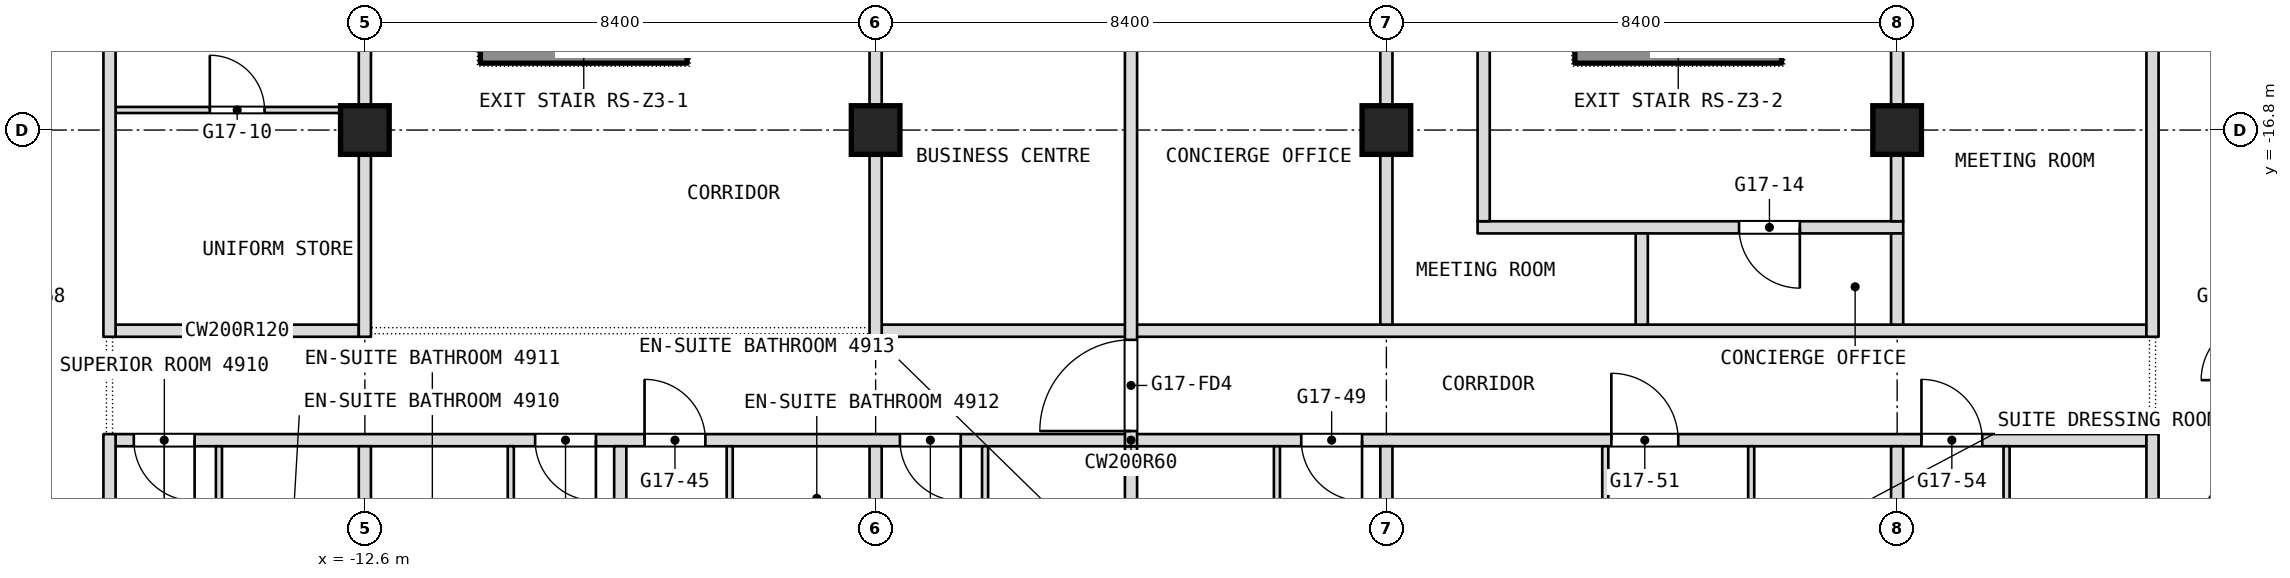
"""IFC4 building model, lengths in metres.
Left out: names, types, materials, properties, quantities, classifications, styles, units other than length and angle.
Written with IfcOpenShell. Run it as: python <this file> out.ifc"""

import sys

from ifc_helpers import new_model, si_unit, direction, frame, frame_2d, origin, origin_2d, place, context, subcontext, project, spatial, rectangle, extrude, element, fill, save


model = new_model("IFC4")
c1 = context("Model", 3, precision=1e-05, world=origin(), true_north=direction((0.0, 1.0)))
c2 = subcontext(c1, "Body", "Model", "MODEL_VIEW")
j1 = project(units=[si_unit("LENGTHUNIT", "METRE"), si_unit("PLANEANGLEUNIT", "RADIAN")], contexts=[c1])
p1 = place(None, origin())
s1 = spatial("IfcSite", under=j1, at=p1, CompositionType="ELEMENT")
p2 = place(p1, origin())
s2 = spatial("IfcBuilding", under=s1, at=p2, CompositionType="ELEMENT")
p3 = place(p2, frame((0.0, 0.0, 212.9)))
s3 = spatial("IfcBuildingStorey", under=s2, at=p3, CompositionType="ELEMENT", Elevation=212.9)
for number, where, z_axis, x_axis in (
    (1, (-12.6, -16.8, 0.0), (0.0, 0.0, 1.0), (1.0, 0.0, 0.0)),
    (2, (-4.2, -16.8, 0.0), (0.0, 0.0, 1.0), (1.0, 0.0, 0.0)),
    (3, (4.2, -16.8, 0.0), (0.0, 0.0, 1.0), (1.0, 0.0, 0.0)),
    (4, (12.6, -16.8, 0.0), (0.0, 0.0, 1.0), (1.0, 0.0, 0.0)),
):
    element("IfcColumn", number, at=place(p3, frame(where, z_axis=z_axis, x_axis=x_axis)), inside=s3, PredefinedType="COLUMN", context=c2, shape_type="SweptSolid", body=[
        extrude(rectangle(XDim=0.8, YDim=0.8, at=origin_2d()), origin(), (0.0, 0.0, 1.0), 3.6),
    ])
p4 = place(p3, frame((-16.7, -21.9, 0.0), z_axis=(0.0, 0.0, 1.0), x_axis=(1.0, 0.0, 0.0)))
e5 = element("IfcWall", 5, at=p4, inside=s3, PredefinedType="PARTITIONING", context=c2, shape_type="SweptSolid", body=[
    extrude(rectangle(XDim=33.4, YDim=0.2, at=frame_2d((16.7, 0.0))), origin(), (0.0, 0.0, 1.0), 3.34),
])
p5 = place(p4, frame((0.3, 0.0, 0.0)))
e6 = element("IfcOpeningElement", 6, at=p5, cuts=e5, PredefinedType="OPENING", context=c2, shape_type="SweptSolid", body=[
    extrude(rectangle(XDim=1.0, YDim=2.1, at=frame_2d((0.5, 1.05))), frame((0.0, 0.1, 0.0), z_axis=(0.0, -1.0, 0.0), x_axis=(1.0, 0.0, 0.0)), (0.0, 0.0, 1.0), 0.2),
])
p6 = place(p4, frame((6.9, 0.0, 0.0)))
e7 = element("IfcOpeningElement", 7, at=p6, cuts=e5, PredefinedType="OPENING", context=c2, shape_type="SweptSolid", body=[
    extrude(rectangle(XDim=1.0, YDim=2.1, at=frame_2d((0.5, 1.05))), frame((0.0, 0.1, 0.0), z_axis=(0.0, -1.0, 0.0), x_axis=(1.0, 0.0, 0.0)), (0.0, 0.0, 1.0), 0.2),
])
p7 = place(p4, frame((8.7, 0.0, 0.0)))
e8 = element("IfcOpeningElement", 8, at=p7, cuts=e5, PredefinedType="OPENING", context=c2, shape_type="SweptSolid", body=[
    extrude(rectangle(XDim=1.0, YDim=2.1, at=frame_2d((0.5, 1.05))), frame((0.0, 0.1, 0.0), z_axis=(0.0, -1.0, 0.0), x_axis=(1.0, 0.0, 0.0)), (0.0, 0.0, 1.0), 0.2),
])
p8 = place(p4, frame((12.9, 0.0, 0.0)))
e9 = element("IfcOpeningElement", 9, at=p8, cuts=e5, PredefinedType="OPENING", context=c2, shape_type="SweptSolid", body=[
    extrude(rectangle(XDim=1.0, YDim=2.1, at=frame_2d((0.5, 1.05))), frame((0.0, 0.1, 0.0), z_axis=(0.0, -1.0, 0.0), x_axis=(1.0, 0.0, 0.0)), (0.0, 0.0, 1.0), 0.2),
])
p9 = place(p4, frame((19.5, 0.0, 0.0)))
e10 = element("IfcOpeningElement", 10, at=p9, cuts=e5, PredefinedType="OPENING", context=c2, shape_type="SweptSolid", body=[
    extrude(rectangle(XDim=1.0, YDim=2.1, at=frame_2d((0.5, 1.05))), frame((0.0, 0.1, 0.0), z_axis=(0.0, -1.0, 0.0), x_axis=(1.0, 0.0, 0.0)), (0.0, 0.0, 1.0), 0.2),
])
p10 = place(p4, frame((24.6, 0.0, 0.0)))
e11 = element("IfcOpeningElement", 11, at=p10, cuts=e5, PredefinedType="OPENING", context=c2, shape_type="SweptSolid", body=[
    extrude(rectangle(XDim=1.1, YDim=2.1, at=frame_2d((0.55, 1.05))), frame((0.0, 0.1, 0.0), z_axis=(0.0, -1.0, 0.0), x_axis=(1.0, 0.0, 0.0)), (0.0, 0.0, 1.0), 0.2),
])
p11 = place(p4, frame((29.7, 0.0, 0.0)))
e12 = element("IfcOpeningElement", 12, at=p11, cuts=e5, PredefinedType="OPENING", context=c2, shape_type="SweptSolid", body=[
    extrude(rectangle(XDim=1.0, YDim=2.1, at=frame_2d((0.5, 1.05))), frame((0.0, 0.1, 0.0), z_axis=(0.0, -1.0, 0.0), x_axis=(1.0, 0.0, 0.0)), (0.0, 0.0, 1.0), 0.2),
])
p12 = place(p3, frame((-16.7, -20.1, 0.0), z_axis=(0.0, 0.0, 1.0), x_axis=(1.0, 0.0, 0.0)))
e13 = element("IfcWall", 13, at=p12, inside=s3, PredefinedType="PARTITIONING", context=c2, shape_type="SweptSolid", body=[
    extrude(rectangle(XDim=4.0, YDim=0.2, at=frame_2d((2.0, 0.0))), origin(), (0.0, 0.0, 1.0), 3.34),
])
p13 = place(p3, frame((-4.1, -20.1, 0.0), z_axis=(0.0, 0.0, 1.0), x_axis=(1.0, 0.0, 0.0)))
e14 = element("IfcWall", 14, at=p13, inside=s3, PredefinedType="PARTITIONING", context=c2, shape_type="SweptSolid", body=[
    extrude(rectangle(XDim=20.8, YDim=0.2, at=frame_2d((10.4, 0.0))), origin(), (0.0, 0.0, 1.0), 3.34),
])
p14 = place(p3, frame((5.7, -18.4, 0.0), z_axis=(0.0, 0.0, 1.0), x_axis=(1.0, 0.0, 0.0)))
e15 = element("IfcWall", 15, at=p14, inside=s3, PredefinedType="PARTITIONING", context=c2, shape_type="SweptSolid", body=[
    extrude(rectangle(XDim=7.0, YDim=0.2, at=frame_2d((3.5, 0.0))), origin(), (0.0, 0.0, 1.0), 3.34),
])
p15 = place(p14, frame((4.3, 0.0, 0.0)))
e16 = element("IfcOpeningElement", 16, at=p15, cuts=e15, PredefinedType="OPENING", context=c2, shape_type="SweptSolid", body=[
    extrude(rectangle(XDim=1.0, YDim=2.1, at=frame_2d((0.5, 1.05))), frame((0.0, 0.1, 0.0), z_axis=(0.0, -1.0, 0.0), x_axis=(1.0, 0.0, 0.0)), (0.0, 0.0, 1.0), 0.2),
])
p16 = place(p3, frame((16.8, -27.229, 0.0), z_axis=(0.0, 0.0, 1.0), x_axis=(0.0, 1.0, 0.0)))
e17 = element("IfcWall", 17, at=p16, inside=s3, PredefinedType="PARTITIONING", context=c2, shape_type="SweptSolid", body=[
    extrude(rectangle(XDim=5.429, YDim=0.2, at=frame_2d((2.714, 0.0))), origin(), (0.0, 0.0, 1.0), 3.34),
])
p17 = place(p3, frame((16.8, -20.2, 0.0), z_axis=(0.0, 0.0, 1.0), x_axis=(0.0, 1.0, 0.0)))
e18 = element("IfcWall", 18, at=p17, inside=s3, PredefinedType="PARTITIONING", context=c2, shape_type="SweptSolid", body=[
    extrude(rectangle(XDim=6.8, YDim=0.2, at=frame_2d((3.4, 0.0))), origin(), (0.0, 0.0, 1.0), 3.34),
])
p18 = place(p3, frame((-16.7, -16.47, 0.0), z_axis=(0.0, 0.0, 1.0), x_axis=(1.0, 0.0, 0.0)))
e19 = element("IfcWall", 19, at=p18, inside=s3, PredefinedType="PARTITIONING", context=c2, shape_type="SweptSolid", body=[
    extrude(rectangle(XDim=4.0, YDim=0.1, at=frame_2d((2.0, 0.0))), origin(), (0.0, 0.0, 1.0), 3.34),
])
p19 = place(p18, frame((1.55, 0.0, 0.0)))
e20 = element("IfcOpeningElement", 20, at=p19, cuts=e19, PredefinedType="OPENING", context=c2, shape_type="SweptSolid", body=[
    extrude(rectangle(XDim=0.9, YDim=2.1, at=frame_2d((0.45, 1.05))), frame((0.0, 0.05, 0.0), z_axis=(0.0, -1.0, 0.0), x_axis=(1.0, 0.0, 0.0)), (0.0, 0.0, 1.0), 0.1),
])
p20 = place(p3, frame((14.4, -25.85, 0.0), z_axis=(0.0, 0.0, 1.0), x_axis=(0.0, 1.0, 0.0)))
e21 = element("IfcWall", 21, at=p20, inside=s3, PredefinedType="PARTITIONING", context=c2, shape_type="SweptSolid", body=[
    extrude(rectangle(XDim=3.85, YDim=0.1, at=frame_2d((1.925, 0.0))), origin(), (0.0, 0.0, 1.0), 3.34),
])
p21 = place(p3, frame((12.6, -28.343, 0.0), z_axis=(0.0, 0.0, 1.0), x_axis=(0.0, 1.0, 0.0)))
e22 = element("IfcWall", 22, at=p21, inside=s3, PredefinedType="PARTITIONING", context=c2, shape_type="SweptSolid", body=[
    extrude(rectangle(XDim=6.343, YDim=0.2, at=frame_2d((3.171, 0.0))), origin(), (0.0, 0.0, 1.0), 3.34),
])
p22 = place(p3, frame((12.6, -20.0, 0.0), z_axis=(0.0, 0.0, 1.0), x_axis=(0.0, 1.0, 0.0)))
e23 = element("IfcWall", 23, at=p22, inside=s3, PredefinedType="PARTITIONING", context=c2, shape_type="SweptSolid", body=[
    extrude(rectangle(XDim=1.5, YDim=0.2, at=frame_2d((0.75, 0.0))), origin(), (0.0, 0.0, 1.0), 3.34),
])
p23 = place(p3, frame((12.6, -18.3, 0.0), z_axis=(0.0, 0.0, 1.0), x_axis=(0.0, 1.0, 0.0)))
e24 = element("IfcWall", 24, at=p23, inside=s3, PredefinedType="PARTITIONING", context=c2, shape_type="SweptSolid", body=[
    extrude(rectangle(XDim=4.7, YDim=0.2, at=frame_2d((2.35, 0.0))), origin(), (0.0, 0.0, 1.0), 3.34),
])
p24 = place(p3, frame((10.2, -25.55, 0.0), z_axis=(0.0, 0.0, 1.0), x_axis=(0.0, 1.0, 0.0)))
e25 = element("IfcWall", 25, at=p24, inside=s3, PredefinedType="PARTITIONING", context=c2, shape_type="SweptSolid", body=[
    extrude(rectangle(XDim=3.55, YDim=0.1, at=frame_2d((1.775, 0.0))), origin(), (0.0, 0.0, 1.0), 3.34),
])
p25 = place(p3, frame((8.4, -20.0, 0.0), z_axis=(0.0, 0.0, 1.0), x_axis=(0.0, 1.0, 0.0)))
e26 = element("IfcWall", 26, at=p25, inside=s3, PredefinedType="PARTITIONING", context=c2, shape_type="SweptSolid", body=[
    extrude(rectangle(XDim=1.5, YDim=0.2, at=frame_2d((0.75, 0.0))), origin(), (0.0, 0.0, 1.0), 3.34),
])
p26 = place(p3, frame((7.8, -25.45, 0.0), z_axis=(0.0, 0.0, 1.0), x_axis=(0.0, 1.0, 0.0)))
e27 = element("IfcWall", 27, at=p26, inside=s3, PredefinedType="PARTITIONING", context=c2, shape_type="SweptSolid", body=[
    extrude(rectangle(XDim=3.45, YDim=0.1, at=frame_2d((1.725, 0.0))), origin(), (0.0, 0.0, 1.0), 3.34),
])
p27 = place(p3, frame((5.8, -18.3, 0.0), z_axis=(0.0, 0.0, 1.0), x_axis=(0.0, 1.0, 0.0)))
e28 = element("IfcWall", 28, at=p27, inside=s3, PredefinedType="PARTITIONING", context=c2, shape_type="SweptSolid", body=[
    extrude(rectangle(XDim=4.9, YDim=0.2, at=frame_2d((2.45, 0.0))), origin(), (0.0, 0.0, 1.0), 3.34),
])
p28 = place(p3, frame((4.2, -28.9, 0.0), z_axis=(0.0, 0.0, 1.0), x_axis=(0.0, 1.0, 0.0)))
e29 = element("IfcWall", 29, at=p28, inside=s3, PredefinedType="PARTITIONING", context=c2, shape_type="SweptSolid", body=[
    extrude(rectangle(XDim=6.9, YDim=0.2, at=frame_2d((3.45, 0.0))), origin(), (0.0, 0.0, 1.0), 3.34),
])
p29 = place(p3, frame((4.2, -20.0, 0.0), z_axis=(0.0, 0.0, 1.0), x_axis=(0.0, 1.0, 0.0)))
e30 = element("IfcWall", 30, at=p29, inside=s3, PredefinedType="PARTITIONING", context=c2, shape_type="SweptSolid", body=[
    extrude(rectangle(XDim=6.4, YDim=0.2, at=frame_2d((3.2, 0.0))), origin(), (0.0, 0.0, 1.0), 3.34),
])
p30 = place(p3, frame((2.4, -25.75, 0.0), z_axis=(0.0, 0.0, 1.0), x_axis=(0.0, 1.0, 0.0)))
e31 = element("IfcWall", 31, at=p30, inside=s3, PredefinedType="PARTITIONING", context=c2, shape_type="SweptSolid", body=[
    extrude(rectangle(XDim=3.75, YDim=0.1, at=frame_2d((1.875, 0.0))), origin(), (0.0, 0.0, 1.0), 3.34),
])
p31 = place(p3, frame((0.0, -28.9, 0.0), z_axis=(0.0, 0.0, 1.0), x_axis=(0.0, 1.0, 0.0)))
e32 = element("IfcWall", 32, at=p31, inside=s3, PredefinedType="PARTITIONING", context=c2, shape_type="SweptSolid", body=[
    extrude(rectangle(XDim=6.9, YDim=0.2, at=frame_2d((3.45, 0.0))), origin(), (0.0, 0.0, 1.0), 3.34),
])
p32 = place(p3, frame((0.0, -22.0, 0.0), z_axis=(0.0, 0.0, 1.0), x_axis=(0.0, 1.0, 0.0)))
e33 = element("IfcWall", 33, at=p32, inside=s3, PredefinedType="PARTITIONING", context=c2, shape_type="SweptSolid", body=[
    extrude(rectangle(XDim=8.4, YDim=0.2, at=frame_2d((4.2, 0.0))), origin(), (0.0, 0.0, 1.0), 3.34),
])
p33 = place(p32, frame((0.25, 0.0, 0.0)))
e34 = element("IfcOpeningElement", 34, at=p33, cuts=e33, PredefinedType="OPENING", context=c2, shape_type="SweptSolid", body=[
    extrude(rectangle(XDim=1.5, YDim=2.1, at=frame_2d((0.75, 1.05))), frame((0.0, 0.1, 0.0), z_axis=(0.0, -1.0, 0.0), x_axis=(1.0, 0.0, 0.0)), (0.0, 0.0, 1.0), 0.2),
])
p34 = place(p3, frame((-2.4, -25.35, 0.0), z_axis=(0.0, 0.0, 1.0), x_axis=(0.0, 1.0, 0.0)))
e35 = element("IfcWall", 35, at=p34, inside=s3, PredefinedType="PARTITIONING", context=c2, shape_type="SweptSolid", body=[
    extrude(rectangle(XDim=3.35, YDim=0.1, at=frame_2d((1.675, 0.0))), origin(), (0.0, 0.0, 1.0), 3.34),
])
p35 = place(p3, frame((-4.2, -28.9, 0.0), z_axis=(0.0, 0.0, 1.0), x_axis=(0.0, 1.0, 0.0)))
e36 = element("IfcWall", 36, at=p35, inside=s3, PredefinedType="PARTITIONING", context=c2, shape_type="SweptSolid", body=[
    extrude(rectangle(XDim=6.9, YDim=0.2, at=frame_2d((3.45, 0.0))), origin(), (0.0, 0.0, 1.0), 3.34),
])
p36 = place(p3, frame((-4.2, -20.2, 0.0), z_axis=(0.0, 0.0, 1.0), x_axis=(0.0, 1.0, 0.0)))
e37 = element("IfcWall", 37, at=p36, inside=s3, PredefinedType="PARTITIONING", context=c2, shape_type="SweptSolid", body=[
    extrude(rectangle(XDim=6.6, YDim=0.2, at=frame_2d((3.3, 0.0))), origin(), (0.0, 0.0, 1.0), 3.34),
])
p37 = place(p3, frame((-6.6, -24.75, 0.0), z_axis=(0.0, 0.0, 1.0), x_axis=(0.0, 1.0, 0.0)))
e38 = element("IfcWall", 38, at=p37, inside=s3, PredefinedType="PARTITIONING", context=c2, shape_type="SweptSolid", body=[
    extrude(rectangle(XDim=2.75, YDim=0.1, at=frame_2d((1.375, 0.0))), origin(), (0.0, 0.0, 1.0), 3.34),
])
p38 = place(p3, frame((-8.4, -28.9, 0.0), z_axis=(0.0, 0.0, 1.0), x_axis=(0.0, 1.0, 0.0)))
e39 = element("IfcWall", 39, at=p38, inside=s3, PredefinedType="PARTITIONING", context=c2, shape_type="SweptSolid", body=[
    extrude(rectangle(XDim=6.9, YDim=0.2, at=frame_2d((3.45, 0.0))), origin(), (0.0, 0.0, 1.0), 3.34),
])
p39 = place(p3, frame((-10.2, -24.85, 0.0), z_axis=(0.0, 0.0, 1.0), x_axis=(0.0, 1.0, 0.0)))
e40 = element("IfcWall", 40, at=p39, inside=s3, PredefinedType="PARTITIONING", context=c2, shape_type="SweptSolid", body=[
    extrude(rectangle(XDim=2.85, YDim=0.1, at=frame_2d((1.425, 0.0))), origin(), (0.0, 0.0, 1.0), 3.34),
])
p40 = place(p3, frame((-12.6, -28.343, 0.0), z_axis=(0.0, 0.0, 1.0), x_axis=(0.0, 1.0, 0.0)))
e41 = element("IfcWall", 41, at=p40, inside=s3, PredefinedType="PARTITIONING", context=c2, shape_type="SweptSolid", body=[
    extrude(rectangle(XDim=6.343, YDim=0.2, at=frame_2d((3.171, 0.0))), origin(), (0.0, 0.0, 1.0), 3.34),
])
p41 = place(p3, frame((-12.6, -20.2, 0.0), z_axis=(0.0, 0.0, 1.0), x_axis=(0.0, 1.0, 0.0)))
e42 = element("IfcWall", 42, at=p41, inside=s3, PredefinedType="PARTITIONING", context=c2, shape_type="SweptSolid", body=[
    extrude(rectangle(XDim=6.8, YDim=0.2, at=frame_2d((3.4, 0.0))), origin(), (0.0, 0.0, 1.0), 3.34),
])
p42 = place(p3, frame((-15.0, -25.85, 0.0), z_axis=(0.0, 0.0, 1.0), x_axis=(0.0, 1.0, 0.0)))
e43 = element("IfcWall", 43, at=p42, inside=s3, PredefinedType="PARTITIONING", context=c2, shape_type="SweptSolid", body=[
    extrude(rectangle(XDim=3.85, YDim=0.1, at=frame_2d((1.925, 0.0))), origin(), (0.0, 0.0, 1.0), 3.34),
])
p43 = place(p3, frame((-16.8, -27.229, 0.0), z_axis=(0.0, 0.0, 1.0), x_axis=(0.0, 1.0, 0.0)))
e44 = element("IfcWall", 44, at=p43, inside=s3, PredefinedType="PARTITIONING", context=c2, shape_type="SweptSolid", body=[
    extrude(rectangle(XDim=5.429, YDim=0.2, at=frame_2d((2.714, 0.0))), origin(), (0.0, 0.0, 1.0), 3.34),
])
p44 = place(p3, frame((-16.8, -20.2, 0.0), z_axis=(0.0, 0.0, 1.0), x_axis=(0.0, 1.0, 0.0)))
e45 = element("IfcWall", 45, at=p44, inside=s3, PredefinedType="PARTITIONING", context=c2, shape_type="SweptSolid", body=[
    extrude(rectangle(XDim=6.8, YDim=0.2, at=frame_2d((3.4, 0.0))), origin(), (0.0, 0.0, 1.0), 3.34),
])
for number, where, z_axis, x_axis in (
    (46, (-10.7, -15.575, 0.1), (0.0, 0.0, 1.0), (1.0, 0.0, 0.0)),
    (47, (7.3, -15.575, 0.1), (0.0, 0.0, 1.0), (1.0, 0.0, 0.0)),
):
    element("IfcWall", number, at=place(p3, frame(where, z_axis=z_axis, x_axis=x_axis)), inside=s3, PredefinedType="SHEAR", context=c2, shape_type="SweptSolid", body=[
        extrude(rectangle(XDim=3.4, YDim=0.25, at=frame_2d((1.7, 0.0))), origin(), (0.0, 0.0, 1.0), 3.6),
    ])
p45 = place(p5, origin())
e48 = element("IfcDoor", 48, at=p45, inside=s3, OperationType="SINGLE_SWING_RIGHT", PredefinedType="DOOR", context=c2, shape_type="SweptSolid", body=[
    extrude(rectangle(XDim=1.0, YDim=2.1, at=frame_2d((0.5, 1.05))), frame((0.0, 0.025, 0.0), z_axis=(0.0, -1.0, 0.0), x_axis=(1.0, 0.0, 0.0)), (0.0, 0.0, 1.0), 0.05),
])
fill(e6, e48)
p46 = place(p6, origin())
e49 = element("IfcDoor", 49, at=p46, inside=s3, OperationType="SINGLE_SWING_LEFT", PredefinedType="DOOR", context=c2, shape_type="SweptSolid", body=[
    extrude(rectangle(XDim=1.0, YDim=2.1, at=frame_2d((0.5, 1.05))), frame((0.0, 0.025, 0.0), z_axis=(0.0, -1.0, 0.0), x_axis=(1.0, 0.0, 0.0)), (0.0, 0.0, 1.0), 0.05),
])
fill(e7, e49)
p47 = place(p7, origin())
e50 = element("IfcDoor", 50, at=p47, inside=s3, OperationType="SINGLE_SWING_LEFT", PredefinedType="DOOR", context=c2, shape_type="SweptSolid", body=[
    extrude(rectangle(XDim=1.0, YDim=2.1, at=frame_2d((0.5, 1.05))), frame((0.0, 0.025, 0.0), z_axis=(0.0, -1.0, 0.0), x_axis=(1.0, 0.0, 0.0)), (0.0, 0.0, 1.0), 0.05),
])
fill(e8, e50)
p48 = place(p8, origin())
e51 = element("IfcDoor", 51, at=p48, inside=s3, OperationType="SINGLE_SWING_LEFT", PredefinedType="DOOR", context=c2, shape_type="SweptSolid", body=[
    extrude(rectangle(XDim=1.0, YDim=2.1, at=frame_2d((0.5, 1.05))), frame((0.0, 0.025, 0.0), z_axis=(0.0, -1.0, 0.0), x_axis=(1.0, 0.0, 0.0)), (0.0, 0.0, 1.0), 0.05),
])
fill(e9, e51)
p49 = place(p9, origin())
e52 = element("IfcDoor", 52, at=p49, inside=s3, OperationType="SINGLE_SWING_LEFT", PredefinedType="DOOR", context=c2, shape_type="SweptSolid", body=[
    extrude(rectangle(XDim=1.0, YDim=2.1, at=frame_2d((0.5, 1.05))), frame((0.0, 0.025, 0.0), z_axis=(0.0, -1.0, 0.0), x_axis=(1.0, 0.0, 0.0)), (0.0, 0.0, 1.0), 0.05),
])
fill(e10, e52)
p50 = place(p10, origin())
e53 = element("IfcDoor", 53, at=p50, inside=s3, OperationType="SINGLE_SWING_RIGHT", PredefinedType="DOOR", context=c2, shape_type="SweptSolid", body=[
    extrude(rectangle(XDim=1.1, YDim=2.1, at=frame_2d((0.55, 1.05))), frame((0.0, 0.025, 0.0), z_axis=(0.0, -1.0, 0.0), x_axis=(1.0, 0.0, 0.0)), (0.0, 0.0, 1.0), 0.05),
])
fill(e11, e53)
p51 = place(p11, origin())
e54 = element("IfcDoor", 54, at=p51, inside=s3, OperationType="SINGLE_SWING_RIGHT", PredefinedType="DOOR", context=c2, shape_type="SweptSolid", body=[
    extrude(rectangle(XDim=1.0, YDim=2.1, at=frame_2d((0.5, 1.05))), frame((0.0, 0.025, 0.0), z_axis=(0.0, -1.0, 0.0), x_axis=(1.0, 0.0, 0.0)), (0.0, 0.0, 1.0), 0.05),
])
fill(e12, e54)
p52 = place(p15, origin())
e55 = element("IfcDoor", 55, at=p52, inside=s3, OperationType="SINGLE_SWING_LEFT", PredefinedType="DOOR", context=c2, shape_type="SweptSolid", body=[
    extrude(rectangle(XDim=1.0, YDim=2.1, at=frame_2d((0.5, 1.05))), frame((0.0, 0.025, 0.0), z_axis=(0.0, -1.0, 0.0), x_axis=(1.0, 0.0, 0.0)), (0.0, 0.0, 1.0), 0.05),
])
fill(e16, e55)
p53 = place(p19, origin())
e56 = element("IfcDoor", 56, at=p53, inside=s3, OperationType="SINGLE_SWING_LEFT", PredefinedType="DOOR", context=c2, shape_type="SweptSolid", body=[
    extrude(rectangle(XDim=0.9, YDim=2.1, at=frame_2d((0.45, 1.05))), frame((0.0, 0.025, 0.0), z_axis=(0.0, -1.0, 0.0), x_axis=(1.0, 0.0, 0.0)), (0.0, 0.0, 1.0), 0.05),
])
fill(e20, e56)
p54 = place(p33, origin())
e57 = element("IfcDoor", 57, at=p54, inside=s3, OperationType="DOUBLE_DOOR_DOUBLE_SWING", PredefinedType="DOOR", context=c2, shape_type="SweptSolid", body=[
    extrude(rectangle(XDim=1.5, YDim=2.1, at=frame_2d((0.75, 1.05))), frame((0.0, 0.025, 0.0), z_axis=(0.0, -1.0, 0.0), x_axis=(1.0, 0.0, 0.0)), (0.0, 0.0, 1.0), 0.05),
])
fill(e34, e57)
save(model, sys.argv[1])
